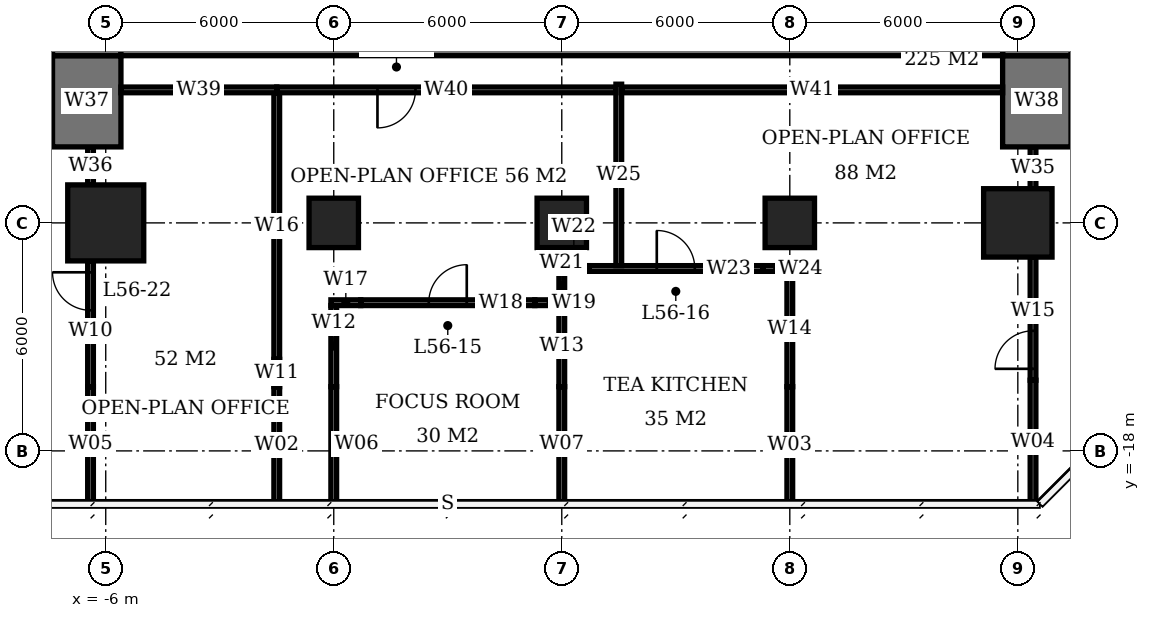
"""IFC4 building model, lengths in metres.
Left out: names, types, materials, properties, quantities, classifications, styles, units other than length and angle.
Written with IfcOpenShell. Run it as: python <this file> out.ifc"""

import sys

from ifc_helpers import new_model, si_unit, direction, frame, frame_2d, origin, origin_2d, place, context, subcontext, project, spatial, rectangle, extrude, element, fill, save


model = new_model("IFC4")
c1 = context("Model", 3, precision=1e-05, world=origin(), true_north=direction((0.0, 1.0)))
c2 = subcontext(c1, "Body", "Model", "MODEL_VIEW")
j1 = project(units=[si_unit("LENGTHUNIT", "METRE"), si_unit("PLANEANGLEUNIT", "RADIAN")], contexts=[c1])
p1 = place(None, origin())
s1 = spatial("IfcSite", under=j1, at=p1, CompositionType="ELEMENT")
p2 = place(p1, origin())
s2 = spatial("IfcBuilding", under=s1, at=p2, CompositionType="ELEMENT")
p3 = place(p2, frame((0.0, 0.0, 227.9)))
s3 = spatial("IfcBuildingStorey", under=s2, at=p3, CompositionType="ELEMENT", Elevation=227.9)
p4 = place(p3, frame((-6.0, -12.0, 0.0), z_axis=(0.0, 0.0, 1.0), x_axis=(1.0, 0.0, 0.0)))
e1 = element("IfcColumn", 1, at=p4, inside=s3, PredefinedType="COLUMN", context=c2, shape_type="SweptSolid", body=[
    extrude(rectangle(XDim=2.0, YDim=2.0, at=origin_2d()), origin(), (0.0, 0.0, 1.0), 3.9),
])
for number, where, z_axis, x_axis in (
    (2, (0.0, -12.0, 0.0), (0.0, 0.0, 1.0), (1.0, 0.0, 0.0)),
    (3, (6.0, -12.0, 0.0), (0.0, 0.0, 1.0), (1.0, 0.0, 0.0)),
    (4, (12.0, -12.0, 0.0), (0.0, 0.0, 1.0), (1.0, 0.0, 0.0)),
):
    element("IfcColumn", number, at=place(p3, frame(where, z_axis=z_axis, x_axis=x_axis)), inside=s3, PredefinedType="COLUMN", context=c2, shape_type="SweptSolid", body=[
        extrude(rectangle(XDim=1.3, YDim=1.3, at=origin_2d()), origin(), (0.0, 0.0, 1.0), 3.9),
    ])
p5 = place(p3, frame((18.0, -12.0, 0.0), z_axis=(0.0, 0.0, 1.0), x_axis=(1.0, 0.0, 0.0)))
e5 = element("IfcColumn", 5, at=p5, inside=s3, PredefinedType="COLUMN", context=c2, shape_type="SweptSolid", body=[
    extrude(rectangle(XDim=1.8, YDim=1.8, at=origin_2d()), origin(), (0.0, 0.0, 1.0), 3.9),
])
p6 = place(p3, frame((-5.6, -6.6, 0.0), z_axis=(0.0, 0.0, 1.0), x_axis=(1.0, 0.0, 0.0)))
e6 = element("IfcWall", 6, at=p6, inside=s3, PredefinedType="SHEAR", context=c2, shape_type="SweptSolid", body=[
    extrude(rectangle(XDim=23.2, YDim=2.0, at=frame_2d((11.6, 0.0))), origin(), (0.0, 0.0, 1.0), 3.9),
])
p7 = place(p3, frame((-6.5, -7.6, 0.0), z_axis=(0.0, 0.0, 1.0), x_axis=(0.0, 1.0, 0.0)))
e7 = element("IfcWall", 7, at=p7, inside=s3, PredefinedType="SHEAR", context=c2, shape_type="SweptSolid", body=[
    extrude(rectangle(XDim=21.2, YDim=1.8, at=frame_2d((10.6, 0.0))), origin(), (0.0, 0.0, 1.0), 3.9),
])
p8 = place(p7, frame((7.8, 0.0, 0.0)))
e8 = element("IfcOpeningElement", 8, at=p8, cuts=e7, PredefinedType="OPENING", context=c2, shape_type="SweptSolid", body=[
    extrude(rectangle(XDim=1.8, YDim=2.4, at=frame_2d((0.9, 1.2))), frame((0.0, 0.91, 0.0), z_axis=(0.0, -1.0, 0.0), x_axis=(1.0, 0.0, 0.0)), (0.0, 0.0, 1.0), 1.82),
])
p9 = place(p3, frame((18.5, -7.6, 0.0), z_axis=(0.0, 0.0, 1.0), x_axis=(0.0, 1.0, 0.0)))
e9 = element("IfcWall", 9, at=p9, inside=s3, PredefinedType="SHEAR", context=c2, shape_type="SweptSolid", body=[
    extrude(rectangle(XDim=21.2, YDim=1.8, at=frame_2d((10.6, 0.0))), origin(), (0.0, 0.0, 1.0), 3.9),
])
p10 = place(p9, frame((9.2, 0.0, 0.0)))
e10 = element("IfcOpeningElement", 10, at=p10, cuts=e9, PredefinedType="OPENING", context=c2, shape_type="SweptSolid", body=[
    extrude(rectangle(XDim=1.8, YDim=2.4, at=frame_2d((0.9, 1.2))), frame((0.0, 0.91, 0.0), z_axis=(0.0, -1.0, 0.0), x_axis=(1.0, 0.0, 0.0)), (0.0, 0.0, 1.0), 1.82),
])
for number, where, z_axis, x_axis in (
    (11, (-6.5, -10.0, 0.0), (0.0, 0.0, 1.0), (0.0, 1.0, 0.0)),
    (12, (18.5, -10.0, 0.0), (0.0, 0.0, 1.0), (0.0, 1.0, 0.0)),
):
    element("IfcWall", number, at=place(p3, frame(where, z_axis=z_axis, x_axis=x_axis)), inside=s3, PredefinedType="SHEAR", context=c2, shape_type="SweptSolid", body=[
        extrude(rectangle(XDim=2.4, YDim=1.8, at=frame_2d((1.2, 0.0))), origin(), (0.0, 0.0, 1.0), 3.9),
    ])
p11 = place(p3, frame((-0.075, -14.1, 0.0), z_axis=(0.0, 0.0, 1.0), x_axis=(1.0, 0.0, 0.0)))
e13 = element("IfcWall", 13, at=p11, inside=s3, PredefinedType="PARTITIONING", context=c2, shape_type="SweptSolid", body=[
    extrude(rectangle(XDim=0.785, YDim=0.15, at=frame_2d((0.393, 0.0))), origin(), (0.0, 0.0, 1.0), 2.65),
])
p12 = place(p3, frame((0.71, -14.1, 0.0), z_axis=(0.0, 0.0, 1.0), x_axis=(1.0, 0.0, 0.0)))
e14 = element("IfcWall", 14, at=p12, inside=s3, PredefinedType="PARTITIONING", context=c2, shape_type="SweptSolid", body=[
    extrude(rectangle(XDim=4.58, YDim=0.15, at=frame_2d((2.29, 0.0))), origin(), (0.0, 0.0, 1.0), 3.65),
])
p13 = place(p12, frame((1.79, 0.0, 0.0)))
e15 = element("IfcOpeningElement", 15, at=p13, cuts=e14, PredefinedType="OPENING", context=c2, shape_type="SweptSolid", body=[
    extrude(rectangle(XDim=1.0, YDim=2.1, at=frame_2d((0.5, 1.05))), frame((0.0, 0.085, 0.0), z_axis=(0.0, -1.0, 0.0), x_axis=(1.0, 0.0, 0.0)), (0.0, 0.0, 1.0), 0.17),
])
p14 = place(p3, frame((5.29, -14.1, 0.0), z_axis=(0.0, 0.0, 1.0), x_axis=(1.0, 0.0, 0.0)))
e16 = element("IfcWall", 16, at=p14, inside=s3, PredefinedType="PARTITIONING", context=c2, shape_type="SweptSolid", body=[
    extrude(rectangle(XDim=0.86, YDim=0.15, at=frame_2d((0.43, 0.0))), origin(), (0.0, 0.0, 1.0), 2.65),
])
p15 = place(p3, frame((5.925, -13.2, 0.0), z_axis=(0.0, 0.0, 1.0), x_axis=(1.0, 0.0, 0.0)))
e17 = element("IfcWall", 17, at=p15, inside=s3, PredefinedType="PARTITIONING", context=c2, shape_type="SweptSolid", body=[
    extrude(rectangle(XDim=0.785, YDim=0.15, at=frame_2d((0.393, 0.0))), origin(), (0.0, 0.0, 1.0), 2.65),
])
p16 = place(p3, frame((6.71, -13.2, 0.0), z_axis=(0.0, 0.0, 1.0), x_axis=(1.0, 0.0, 0.0)))
e18 = element("IfcWall", 18, at=p16, inside=s3, PredefinedType="PARTITIONING", context=c2, shape_type="SweptSolid", body=[
    extrude(rectangle(XDim=4.58, YDim=0.15, at=frame_2d((2.29, 0.0))), origin(), (0.0, 0.0, 1.0), 3.65),
])
p17 = place(p16, frame((1.79, 0.0, 0.0)))
e19 = element("IfcOpeningElement", 19, at=p17, cuts=e18, PredefinedType="OPENING", context=c2, shape_type="SweptSolid", body=[
    extrude(rectangle(XDim=1.0, YDim=2.1, at=frame_2d((0.5, 1.05))), frame((0.0, 0.085, 0.0), z_axis=(0.0, -1.0, 0.0), x_axis=(1.0, 0.0, 0.0)), (0.0, 0.0, 1.0), 0.17),
])
p18 = place(p3, frame((11.29, -13.2, 0.0), z_axis=(0.0, 0.0, 1.0), x_axis=(1.0, 0.0, 0.0)))
e20 = element("IfcWall", 20, at=p18, inside=s3, PredefinedType="PARTITIONING", context=c2, shape_type="SweptSolid", body=[
    extrude(rectangle(XDim=0.785, YDim=0.15, at=frame_2d((0.393, 0.0))), origin(), (0.0, 0.0, 1.0), 2.65),
])
p19 = place(p3, frame((0.0, -19.35, 0.0), z_axis=(0.0, 0.0, 1.0), x_axis=(0.0, 1.0, 0.0)))
e21 = element("IfcWall", 21, at=p19, inside=s3, PredefinedType="PARTITIONING", context=c2, shape_type="SweptSolid", body=[
    extrude(rectangle(XDim=3.04, YDim=0.15, at=frame_2d((1.52, 0.0))), origin(), (0.0, 0.0, 1.0), 3.65),
])
p20 = place(p3, frame((0.0, -16.31, 0.0), z_axis=(0.0, 0.0, 1.0), x_axis=(0.0, 1.0, 0.0)))
e22 = element("IfcWall", 22, at=p20, inside=s3, PredefinedType="PARTITIONING", context=c2, shape_type="SweptSolid", body=[
    extrude(rectangle(XDim=2.135, YDim=0.15, at=frame_2d((1.067, 0.0))), origin(), (0.0, 0.0, 1.0), 2.65),
])
p21 = place(p3, frame((6.0, -19.35, 0.0), z_axis=(0.0, 0.0, 1.0), x_axis=(0.0, 1.0, 0.0)))
e23 = element("IfcWall", 23, at=p21, inside=s3, PredefinedType="PARTITIONING", context=c2, shape_type="SweptSolid", body=[
    extrude(rectangle(XDim=3.04, YDim=0.15, at=frame_2d((1.52, 0.0))), origin(), (0.0, 0.0, 1.0), 3.65),
])
p22 = place(p3, frame((6.0, -16.31, 0.0), z_axis=(0.0, 0.0, 1.0), x_axis=(0.0, 1.0, 0.0)))
e24 = element("IfcWall", 24, at=p22, inside=s3, PredefinedType="PARTITIONING", context=c2, shape_type="SweptSolid", body=[
    extrude(rectangle(XDim=2.135, YDim=0.15, at=frame_2d((1.067, 0.0))), origin(), (0.0, 0.0, 1.0), 2.65),
])
p23 = place(p3, frame((6.0, -14.025, 0.0), z_axis=(0.0, 0.0, 1.0), x_axis=(0.0, 1.0, 0.0)))
e25 = element("IfcWall", 25, at=p23, inside=s3, PredefinedType="PARTITIONING", context=c2, shape_type="SweptSolid", body=[
    extrude(rectangle(XDim=0.75, YDim=0.15, at=frame_2d((0.375, 0.0))), origin(), (0.0, 0.0, 1.0), 2.65),
])
p24 = place(p3, frame((12.0, -19.4, 0.0), z_axis=(0.0, 0.0, 1.0), x_axis=(0.0, 1.0, 0.0)))
e26 = element("IfcWall", 26, at=p24, inside=s3, PredefinedType="PARTITIONING", context=c2, shape_type="SweptSolid", body=[
    extrude(rectangle(XDim=3.09, YDim=0.15, at=frame_2d((1.545, 0.0))), origin(), (0.0, 0.0, 1.0), 3.65),
])
p25 = place(p3, frame((12.0, -16.31, 0.0), z_axis=(0.0, 0.0, 1.0), x_axis=(0.0, 1.0, 0.0)))
e27 = element("IfcWall", 27, at=p25, inside=s3, PredefinedType="PARTITIONING", context=c2, shape_type="SweptSolid", body=[
    extrude(rectangle(XDim=3.035, YDim=0.15, at=frame_2d((1.518, 0.0))), origin(), (0.0, 0.0, 1.0), 2.65),
])
p26 = place(p3, frame((-6.4, -19.35, 0.0), z_axis=(0.0, 0.0, 1.0), x_axis=(0.0, 1.0, 0.0)))
e28 = element("IfcWall", 28, at=p26, inside=s3, PredefinedType="PARTITIONING", context=c2, shape_type="SweptSolid", body=[
    extrude(rectangle(XDim=3.04, YDim=0.15, at=frame_2d((1.52, 0.0))), origin(), (0.0, 0.0, 1.0), 3.65),
])
p27 = place(p3, frame((-6.4, -16.31, 0.0), z_axis=(0.0, 0.0, 1.0), x_axis=(0.0, 1.0, 0.0)))
e29 = element("IfcWall", 29, at=p27, inside=s3, PredefinedType="PARTITIONING", context=c2, shape_type="SweptSolid", body=[
    extrude(rectangle(XDim=3.31, YDim=0.15, at=frame_2d((1.655, 0.0))), origin(), (0.0, 0.0, 1.0), 2.65),
])
p28 = place(p27, frame((2.01, 0.0, 0.0)))
e30 = element("IfcOpeningElement", 30, at=p28, cuts=e29, PredefinedType="OPENING", context=c2, shape_type="SweptSolid", body=[
    extrude(rectangle(XDim=1.0, YDim=2.1, at=frame_2d((0.5, 1.05))), frame((0.0, 0.085, 0.0), z_axis=(0.0, -1.0, 0.0), x_axis=(1.0, 0.0, 0.0)), (0.0, 0.0, 1.0), 0.17),
])
p29 = place(p3, frame((-6.4, -11.0, 0.0), z_axis=(0.0, 0.0, 1.0), x_axis=(0.0, 1.0, 0.0)))
e31 = element("IfcWall", 31, at=p29, inside=s3, PredefinedType="PARTITIONING", context=c2, shape_type="SweptSolid", body=[
    extrude(rectangle(XDim=1.0, YDim=0.15, at=frame_2d((0.5, 0.0))), origin(), (0.0, 0.0, 1.0), 3.65),
])
p30 = place(p3, frame((-5.6, -8.5, 0.0), z_axis=(0.0, 0.0, 1.0), x_axis=(1.0, 0.0, 0.0)))
e32 = element("IfcWall", 32, at=p30, inside=s3, PredefinedType="PARTITIONING", context=c2, shape_type="SweptSolid", body=[
    extrude(rectangle(XDim=4.1, YDim=0.15, at=frame_2d((2.05, 0.0))), origin(), (0.0, 0.0, 1.0), 3.65),
])
p31 = place(p3, frame((-1.5, -19.4, 0.0), z_axis=(0.0, 0.0, 1.0), x_axis=(0.0, 1.0, 0.0)))
e33 = element("IfcWall", 33, at=p31, inside=s3, PredefinedType="PARTITIONING", context=c2, shape_type="SweptSolid", body=[
    extrude(rectangle(XDim=3.09, YDim=0.15, at=frame_2d((1.545, 0.0))), origin(), (0.0, 0.0, 1.0), 3.65),
])
p32 = place(p3, frame((-1.5, -16.31, 0.0), z_axis=(0.0, 0.0, 1.0), x_axis=(0.0, 1.0, 0.0)))
e34 = element("IfcWall", 34, at=p32, inside=s3, PredefinedType="PARTITIONING", context=c2, shape_type="SweptSolid", body=[
    extrude(rectangle(XDim=0.72, YDim=0.15, at=frame_2d((0.36, 0.0))), origin(), (0.0, 0.0, 1.0), 2.65),
])
p33 = place(p3, frame((-1.5, -15.59, 0.0), z_axis=(0.0, 0.0, 1.0), x_axis=(0.0, 1.0, 0.0)))
e35 = element("IfcWall", 35, at=p33, inside=s3, PredefinedType="PARTITIONING", context=c2, shape_type="SweptSolid", body=[
    extrude(rectangle(XDim=7.015, YDim=0.15, at=frame_2d((3.508, 0.0))), origin(), (0.0, 0.0, 1.0), 3.65),
])
p34 = place(p3, frame((7.425, -8.5, 0.0), z_axis=(0.0, 0.0, 1.0), x_axis=(-1.0, 0.0, 0.0)))
e36 = element("IfcWall", 36, at=p34, inside=s3, PredefinedType="PARTITIONING", context=c2, shape_type="SweptSolid", body=[
    extrude(rectangle(XDim=8.925, YDim=0.15, at=frame_2d((4.462, 0.0))), origin(), (0.0, 0.0, 1.0), 3.65),
])
p35 = place(p34, frame((5.275, 0.0, 0.0)))
e37 = element("IfcOpeningElement", 37, at=p35, cuts=e36, PredefinedType="OPENING", context=c2, shape_type="SweptSolid", body=[
    extrude(rectangle(XDim=1.0, YDim=2.1, at=frame_2d((0.5, 1.05))), frame((0.0, 0.085, 0.0), z_axis=(0.0, -1.0, 0.0), x_axis=(1.0, 0.0, 0.0)), (0.0, 0.0, 1.0), 0.17),
])
p36 = place(p3, frame((7.5, -13.125, 0.0), z_axis=(0.0, 0.0, 1.0), x_axis=(0.0, 1.0, 0.0)))
e38 = element("IfcWall", 38, at=p36, inside=s3, PredefinedType="PARTITIONING", context=c2, shape_type="SweptSolid", body=[
    extrude(rectangle(XDim=4.775, YDim=0.15, at=frame_2d((2.387, 0.0))), origin(), (0.0, 0.0, 1.0), 3.65),
])
p37 = place(p3, frame((7.575, -8.5, 0.0), z_axis=(0.0, 0.0, 1.0), x_axis=(1.0, 0.0, 0.0)))
e39 = element("IfcWall", 39, at=p37, inside=s3, PredefinedType="PARTITIONING", context=c2, shape_type="SweptSolid", body=[
    extrude(rectangle(XDim=10.025, YDim=0.15, at=frame_2d((5.013, 0.0))), origin(), (0.0, 0.0, 1.0), 3.65),
])
p38 = place(p3, frame((18.4, -19.4, 0.0), z_axis=(0.0, 0.0, 1.0), x_axis=(0.0, 1.0, 0.0)))
e40 = element("IfcWall", 40, at=p38, inside=s3, PredefinedType="PARTITIONING", context=c2, shape_type="SweptSolid", body=[
    extrude(rectangle(XDim=3.26, YDim=0.15, at=frame_2d((1.63, 0.0))), origin(), (0.0, 0.0, 1.0), 3.65),
])
p39 = place(p3, frame((18.4, -16.14, 0.0), z_axis=(0.0, 0.0, 1.0), x_axis=(0.0, 1.0, 0.0)))
e41 = element("IfcWall", 41, at=p39, inside=s3, PredefinedType="PARTITIONING", context=c2, shape_type="SweptSolid", body=[
    extrude(rectangle(XDim=3.24, YDim=0.15, at=frame_2d((1.62, 0.0))), origin(), (0.0, 0.0, 1.0), 2.65),
])
p40 = place(p39, frame((0.3, 0.0, 0.0)))
e42 = element("IfcOpeningElement", 42, at=p40, cuts=e41, PredefinedType="OPENING", context=c2, shape_type="SweptSolid", body=[
    extrude(rectangle(XDim=1.0, YDim=2.1, at=frame_2d((0.5, 1.05))), frame((0.0, 0.085, 0.0), z_axis=(0.0, -1.0, 0.0), x_axis=(1.0, 0.0, 0.0)), (0.0, 0.0, 1.0), 0.17),
])
p41 = place(p3, frame((18.4, -11.1, 0.0), z_axis=(0.0, 0.0, 1.0), x_axis=(0.0, 1.0, 0.0)))
e43 = element("IfcWall", 43, at=p41, inside=s3, PredefinedType="PARTITIONING", context=c2, shape_type="SweptSolid", body=[
    extrude(rectangle(XDim=1.1, YDim=0.15, at=frame_2d((0.55, 0.0))), origin(), (0.0, 0.0, 1.0), 3.65),
])
p42 = place(p13, origin())
e44 = element("IfcDoor", 44, at=p42, inside=s3, OperationType="SINGLE_SWING_RIGHT", PredefinedType="DOOR", context=c2, shape_type="SweptSolid", body=[
    extrude(rectangle(XDim=1.0, YDim=2.1, at=frame_2d((0.5, 1.05))), frame((0.0, 0.025, 0.0), z_axis=(0.0, -1.0, 0.0), x_axis=(1.0, 0.0, 0.0)), (0.0, 0.0, 1.0), 0.05),
])
fill(e15, e44)
p43 = place(p17, origin())
e45 = element("IfcDoor", 45, at=p43, inside=s3, OperationType="SINGLE_SWING_LEFT", PredefinedType="DOOR", context=c2, shape_type="SweptSolid", body=[
    extrude(rectangle(XDim=1.0, YDim=2.1, at=frame_2d((0.5, 1.05))), frame((0.0, 0.025, 0.0), z_axis=(0.0, -1.0, 0.0), x_axis=(1.0, 0.0, 0.0)), (0.0, 0.0, 1.0), 0.05),
])
fill(e19, e45)
p44 = place(p28, origin())
e46 = element("IfcDoor", 46, at=p44, inside=s3, OperationType="SINGLE_SWING_RIGHT", PredefinedType="DOOR", context=c2, shape_type="SweptSolid", body=[
    extrude(rectangle(XDim=1.0, YDim=2.1, at=frame_2d((0.5, 1.05))), frame((0.0, 0.025, 0.0), z_axis=(0.0, -1.0, 0.0), x_axis=(1.0, 0.0, 0.0)), (0.0, 0.0, 1.0), 0.05),
])
fill(e30, e46)
p45 = place(p40, origin())
e47 = element("IfcDoor", 47, at=p45, inside=s3, OperationType="SINGLE_SWING_LEFT", PredefinedType="DOOR", context=c2, shape_type="SweptSolid", body=[
    extrude(rectangle(XDim=1.0, YDim=2.1, at=frame_2d((0.5, 1.05))), frame((0.0, 0.025, 0.0), z_axis=(0.0, -1.0, 0.0), x_axis=(1.0, 0.0, 0.0)), (0.0, 0.0, 1.0), 0.05),
])
fill(e42, e47)
p46 = place(p35, origin())
e48 = element("IfcDoor", 48, at=p46, inside=s3, OperationType="SINGLE_SWING_RIGHT", PredefinedType="DOOR", context=c2, shape_type="SweptSolid", body=[
    extrude(rectangle(XDim=1.0, YDim=2.1, at=frame_2d((0.5, 1.05))), frame((0.0, 0.025, 0.0), z_axis=(0.0, -1.0, 0.0), x_axis=(1.0, 0.0, 0.0)), (0.0, 0.0, 1.0), 0.05),
])
fill(e37, e48)
save(model, sys.argv[1])
